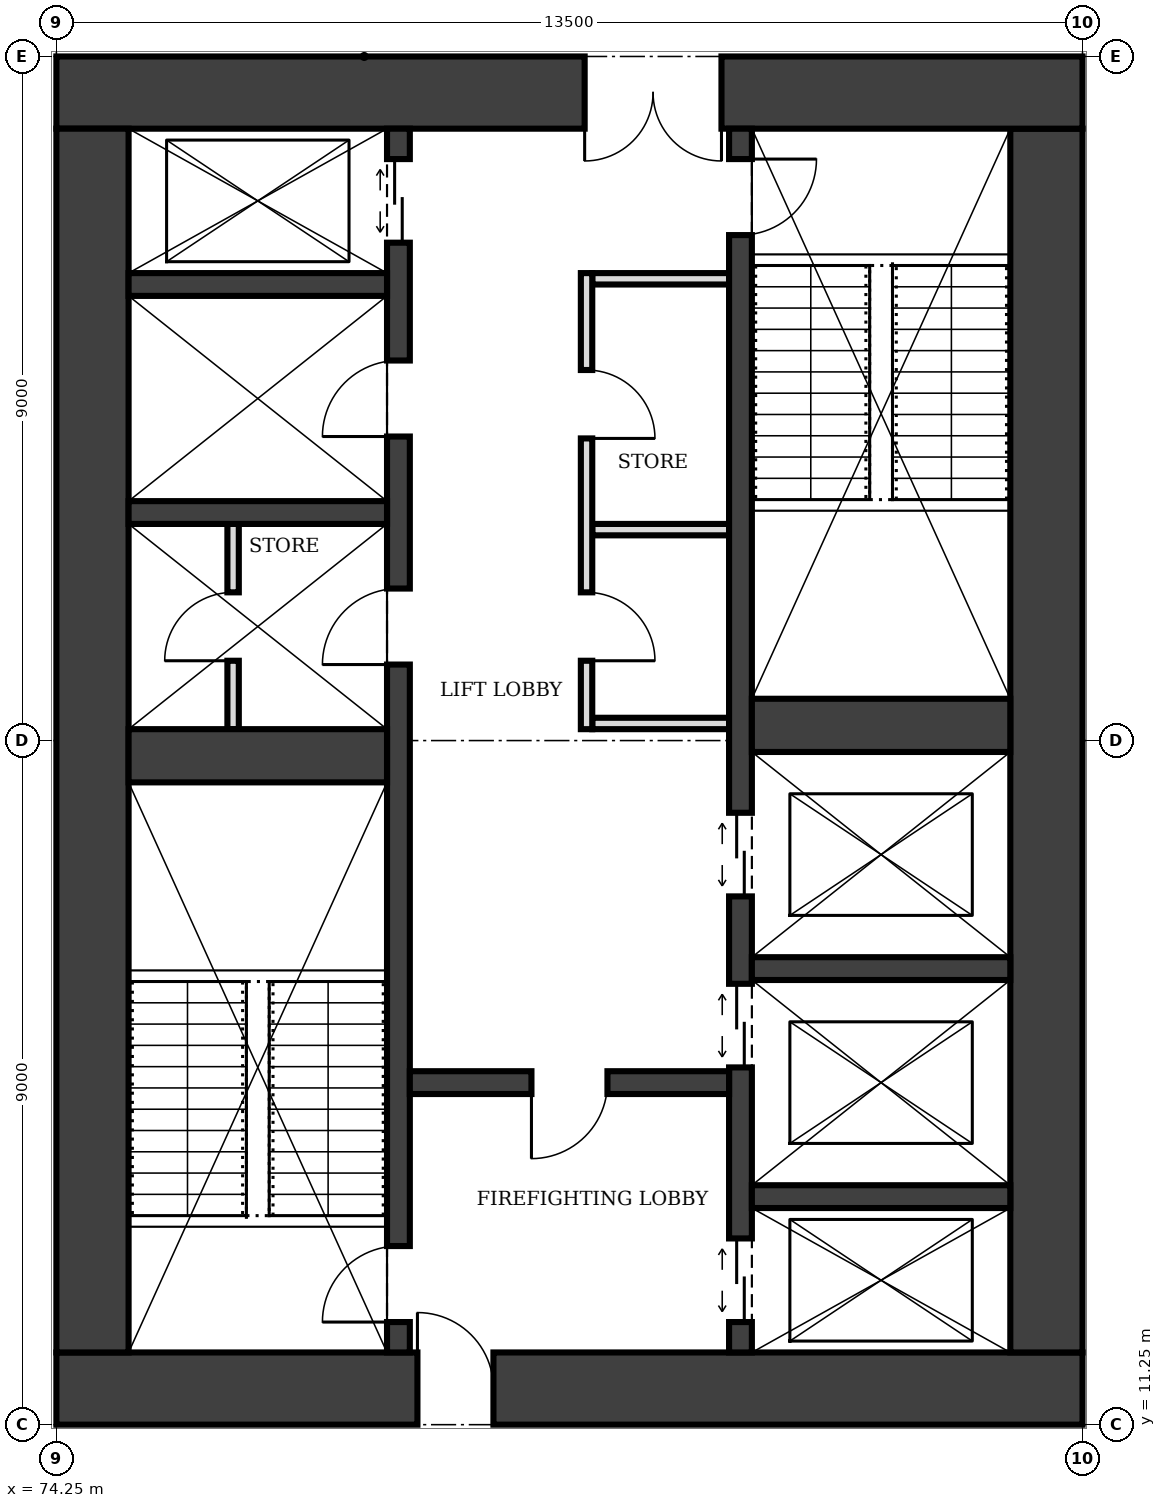
"""IFC4 building model, lengths in metres.
Left out: names, types, materials, properties, quantities, classifications, styles, units other than length and angle.
Written with IfcOpenShell. Run it as: python <this file> out.ifc"""

import sys

from ifc_helpers import new_model, si_unit, direction, frame, frame_2d, origin, place, context, subcontext, project, spatial, rectangle, extrude, element, fill, save


model = new_model("IFC4")
c1 = context("Model", 3, precision=1e-05, world=origin(), true_north=direction((0.0, 1.0)))
c2 = subcontext(c1, "Body", "Model", "MODEL_VIEW")
j1 = project(units=[si_unit("LENGTHUNIT", "METRE"), si_unit("PLANEANGLEUNIT", "RADIAN")], contexts=[c1])
p1 = place(None, origin())
s1 = spatial("IfcSite", under=j1, at=p1, CompositionType="ELEMENT")
p2 = place(p1, origin())
s2 = spatial("IfcBuilding", under=s1, at=p2, CompositionType="ELEMENT")
p3 = place(p2, frame((0.0, 0.0, 177.0)))
s3 = spatial("IfcBuildingStorey", under=s2, at=p3, CompositionType="ELEMENT", Elevation=177.0)
p4 = place(p3, frame((74.25, 11.725, 0.0), z_axis=(0.0, 0.0, 1.0), x_axis=(1.0, 0.0, 0.0)))
e1 = element("IfcWall", 1, at=p4, inside=s3, PredefinedType="SHEAR", context=c2, shape_type="SweptSolid", body=[
    extrude(rectangle(XDim=13.5, YDim=0.95, at=frame_2d((6.75, 0.0))), origin(), (0.0, 0.0, 1.0), 4.0),
])
p5 = place(p4, frame((4.75, 0.0, 0.0)))
e2 = element("IfcOpeningElement", 2, at=p5, cuts=e1, PredefinedType="OPENING", context=c2, shape_type="SweptSolid", body=[
    extrude(rectangle(XDim=1.0, YDim=2.1, at=frame_2d((0.5, 1.05))), frame((0.0, 0.485, 0.0), z_axis=(0.0, -1.0, 0.0), x_axis=(1.0, 0.0, 0.0)), (0.0, 0.0, 1.0), 0.97),
])
p6 = place(p3, frame((87.275, 12.2, 0.0), z_axis=(0.0, 0.0, 1.0), x_axis=(0.0, 1.0, 0.0)))
e3 = element("IfcWall", 3, at=p6, inside=s3, PredefinedType="SHEAR", context=c2, shape_type="SweptSolid", body=[
    extrude(rectangle(XDim=16.1, YDim=0.95, at=frame_2d((8.05, 0.0))), origin(), (0.0, 0.0, 1.0), 4.0),
])
p7 = place(p3, frame((87.75, 28.775, 0.0), z_axis=(0.0, 0.0, 1.0), x_axis=(-1.0, 0.0, 0.0)))
e4 = element("IfcWall", 4, at=p7, inside=s3, PredefinedType="SHEAR", context=c2, shape_type="SweptSolid", body=[
    extrude(rectangle(XDim=13.5, YDim=0.95, at=frame_2d((6.75, 0.0))), origin(), (0.0, 0.0, 1.0), 4.0),
])
p8 = place(p7, frame((4.75, 0.0, 0.0)))
e5 = element("IfcOpeningElement", 5, at=p8, cuts=e4, PredefinedType="OPENING", context=c2, shape_type="SweptSolid", body=[
    extrude(rectangle(XDim=1.8, YDim=2.1, at=frame_2d((0.9, 1.05))), frame((0.0, 0.485, 0.0), z_axis=(0.0, -1.0, 0.0), x_axis=(1.0, 0.0, 0.0)), (0.0, 0.0, 1.0), 0.97),
])
p9 = place(p3, frame((74.725, 28.3, 0.0), z_axis=(0.0, 0.0, 1.0), x_axis=(0.0, -1.0, 0.0)))
e6 = element("IfcWall", 6, at=p9, inside=s3, PredefinedType="SHEAR", context=c2, shape_type="SweptSolid", body=[
    extrude(rectangle(XDim=16.1, YDim=0.95, at=frame_2d((8.05, 0.0))), origin(), (0.0, 0.0, 1.0), 4.0),
])
p10 = place(p3, frame((78.75, 12.2, 0.0), z_axis=(0.0, 0.0, 1.0), x_axis=(0.0, 1.0, 0.0)))
e7 = element("IfcWall", 7, at=p10, inside=s3, PredefinedType="SHEAR", context=c2, shape_type="SweptSolid", body=[
    extrude(rectangle(XDim=16.1, YDim=0.3, at=frame_2d((8.05, 0.0))), origin(), (0.0, 0.0, 1.0), 4.0),
])
p11 = place(p10, frame((0.4, 0.0, 0.0)))
e8 = element("IfcOpeningElement", 8, at=p11, cuts=e7, PredefinedType="OPENING", context=c2, shape_type="SweptSolid", body=[
    extrude(rectangle(XDim=1.0, YDim=2.1, at=frame_2d((0.5, 1.05))), frame((0.0, 0.16, 0.0), z_axis=(0.0, -1.0, 0.0), x_axis=(1.0, 0.0, 0.0)), (0.0, 0.0, 1.0), 0.32),
])
p12 = place(p10, frame((14.6, 0.0, 0.0)))
e9 = element("IfcOpeningElement", 9, at=p12, cuts=e7, PredefinedType="OPENING", context=c2, shape_type="SweptSolid", body=[
    extrude(rectangle(XDim=1.1, YDim=2.1, at=frame_2d((0.55, 1.05))), frame((0.0, 0.16, 0.0), z_axis=(0.0, -1.0, 0.0), x_axis=(1.0, 0.0, 0.0)), (0.0, 0.0, 1.0), 0.32),
])
p13 = place(p10, frame((9.05, 0.0, 0.0)))
e10 = element("IfcOpeningElement", 10, at=p13, cuts=e7, PredefinedType="OPENING", context=c2, shape_type="SweptSolid", body=[
    extrude(rectangle(XDim=1.0, YDim=2.1, at=frame_2d((0.5, 1.05))), frame((0.0, 0.16, 0.0), z_axis=(0.0, -1.0, 0.0), x_axis=(1.0, 0.0, 0.0)), (0.0, 0.0, 1.0), 0.32),
])
p14 = place(p10, frame((12.05, 0.0, 0.0)))
e11 = element("IfcOpeningElement", 11, at=p14, cuts=e7, PredefinedType="OPENING", context=c2, shape_type="SweptSolid", body=[
    extrude(rectangle(XDim=1.0, YDim=2.1, at=frame_2d((0.5, 1.05))), frame((0.0, 0.16, 0.0), z_axis=(0.0, -1.0, 0.0), x_axis=(1.0, 0.0, 0.0)), (0.0, 0.0, 1.0), 0.32),
])
p15 = place(p3, frame((83.25, 12.2, 0.0), z_axis=(0.0, 0.0, 1.0), x_axis=(0.0, 1.0, 0.0)))
e12 = element("IfcWall", 12, at=p15, inside=s3, PredefinedType="SHEAR", context=c2, shape_type="SweptSolid", body=[
    extrude(rectangle(XDim=16.1, YDim=0.3, at=frame_2d((8.05, 0.0))), origin(), (0.0, 0.0, 1.0), 4.0),
])
p16 = place(p15, frame((14.7, 0.0, 0.0)))
e13 = element("IfcOpeningElement", 13, at=p16, cuts=e12, PredefinedType="OPENING", context=c2, shape_type="SweptSolid", body=[
    extrude(rectangle(XDim=1.0, YDim=2.1, at=frame_2d((0.5, 1.05))), frame((0.0, 0.16, 0.0), z_axis=(0.0, -1.0, 0.0), x_axis=(1.0, 0.0, 0.0)), (0.0, 0.0, 1.0), 0.32),
])
p17 = place(p15, frame((0.4, 0.0, 0.0)))
e14 = element("IfcOpeningElement", 14, at=p17, cuts=e12, PredefinedType="OPENING", context=c2, shape_type="SweptSolid", body=[
    extrude(rectangle(XDim=1.1, YDim=2.1, at=frame_2d((0.55, 1.05))), frame((0.0, 0.16, 0.0), z_axis=(0.0, -1.0, 0.0), x_axis=(1.0, 0.0, 0.0)), (0.0, 0.0, 1.0), 0.32),
])
p18 = place(p15, frame((3.75, 0.0, 0.0)))
e15 = element("IfcOpeningElement", 15, at=p18, cuts=e12, PredefinedType="OPENING", context=c2, shape_type="SweptSolid", body=[
    extrude(rectangle(XDim=1.1, YDim=2.1, at=frame_2d((0.55, 1.05))), frame((0.0, 0.16, 0.0), z_axis=(0.0, -1.0, 0.0), x_axis=(1.0, 0.0, 0.0)), (0.0, 0.0, 1.0), 0.32),
])
p19 = place(p15, frame((6.0, 0.0, 0.0)))
e16 = element("IfcOpeningElement", 16, at=p19, cuts=e12, PredefinedType="OPENING", context=c2, shape_type="SweptSolid", body=[
    extrude(rectangle(XDim=1.1, YDim=2.1, at=frame_2d((0.55, 1.05))), frame((0.0, 0.16, 0.0), z_axis=(0.0, -1.0, 0.0), x_axis=(1.0, 0.0, 0.0)), (0.0, 0.0, 1.0), 0.32),
])
p20 = place(p3, frame((75.2, 20.05, 0.0), z_axis=(0.0, 0.0, 1.0), x_axis=(1.0, 0.0, 0.0)))
e17 = element("IfcWall", 17, at=p20, inside=s3, PredefinedType="SHEAR", context=c2, shape_type="SweptSolid", body=[
    extrude(rectangle(XDim=3.4, YDim=0.7, at=frame_2d((1.7, 0.0))), origin(), (0.0, 0.0, 1.0), 4.0),
])
p21 = place(p3, frame((78.9, 15.75, 0.0), z_axis=(0.0, 0.0, 1.0), x_axis=(1.0, 0.0, 0.0)))
e18 = element("IfcWall", 18, at=p21, inside=s3, PredefinedType="SHEAR", context=c2, shape_type="SweptSolid", body=[
    extrude(rectangle(XDim=4.2, YDim=0.3, at=frame_2d((2.1, 0.0))), origin(), (0.0, 0.0, 1.0), 4.0),
])
p22 = place(p21, frame((1.6, 0.0, 0.0)))
e19 = element("IfcOpeningElement", 19, at=p22, cuts=e18, PredefinedType="OPENING", context=c2, shape_type="SweptSolid", body=[
    extrude(rectangle(XDim=1.0, YDim=2.1, at=frame_2d((0.5, 1.05))), frame((0.0, 0.16, 0.0), z_axis=(0.0, -1.0, 0.0), x_axis=(1.0, 0.0, 0.0)), (0.0, 0.0, 1.0), 0.32),
])
for number, where, z_axis, x_axis in (
    (20, (83.4, 14.25, 0.0), (0.0, 0.0, 1.0), (1.0, 0.0, 0.0)),
    (21, (83.4, 17.25, 0.0), (0.0, 0.0, 1.0), (1.0, 0.0, 0.0)),
):
    element("IfcWall", number, at=place(p3, frame(where, z_axis=z_axis, x_axis=x_axis)), inside=s3, PredefinedType="SHEAR", context=c2, shape_type="SweptSolid", body=[
        extrude(rectangle(XDim=3.4, YDim=0.3, at=frame_2d((1.7, 0.0))), origin(), (0.0, 0.0, 1.0), 4.0),
    ])
p23 = place(p3, frame((83.4, 20.45, 0.0), z_axis=(0.0, 0.0, 1.0), x_axis=(1.0, 0.0, 0.0)))
e22 = element("IfcWall", 22, at=p23, inside=s3, PredefinedType="SHEAR", context=c2, shape_type="SweptSolid", body=[
    extrude(rectangle(XDim=3.4, YDim=0.7, at=frame_2d((1.7, 0.0))), origin(), (0.0, 0.0, 1.0), 4.0),
])
for number, where, z_axis, x_axis in (
    (23, (75.2, 23.25, 0.0), (0.0, 0.0, 1.0), (1.0, 0.0, 0.0)),
    (24, (75.2, 26.25, 0.0), (0.0, 0.0, 1.0), (1.0, 0.0, 0.0)),
):
    element("IfcWall", number, at=place(p3, frame(where, z_axis=z_axis, x_axis=x_axis)), inside=s3, PredefinedType="SHEAR", context=c2, shape_type="SweptSolid", body=[
        extrude(rectangle(XDim=3.4, YDim=0.3, at=frame_2d((1.7, 0.0))), origin(), (0.0, 0.0, 1.0), 4.0),
    ])
p24 = place(p3, frame((81.225, 20.4, 0.0), z_axis=(0.0, 0.0, 1.0), x_axis=(0.0, 1.0, 0.0)))
e25 = element("IfcWall", 25, at=p24, inside=s3, PredefinedType="PARTITIONING", context=c2, shape_type="SweptSolid", body=[
    extrude(rectangle(XDim=6.0, YDim=0.15, at=frame_2d((3.0, 0.0))), origin(), (0.0, 0.0, 1.0), 3.75),
])
p25 = place(p24, frame((0.9, 0.0, 0.0)))
e26 = element("IfcOpeningElement", 26, at=p25, cuts=e25, PredefinedType="OPENING", context=c2, shape_type="SweptSolid", body=[
    extrude(rectangle(XDim=0.9, YDim=2.1, at=frame_2d((0.45, 1.05))), frame((0.0, 0.085, 0.0), z_axis=(0.0, -1.0, 0.0), x_axis=(1.0, 0.0, 0.0)), (0.0, 0.0, 1.0), 0.17),
])
p26 = place(p24, frame((3.825, 0.0, 0.0)))
e27 = element("IfcOpeningElement", 27, at=p26, cuts=e25, PredefinedType="OPENING", context=c2, shape_type="SweptSolid", body=[
    extrude(rectangle(XDim=0.9, YDim=2.1, at=frame_2d((0.45, 1.05))), frame((0.0, 0.085, 0.0), z_axis=(0.0, -1.0, 0.0), x_axis=(1.0, 0.0, 0.0)), (0.0, 0.0, 1.0), 0.17),
])
for number, where, z_axis, x_axis in (
    (28, (81.3, 20.475, 0.0), (0.0, 0.0, 1.0), (1.0, 0.0, 0.0)),
    (29, (81.3, 23.025, 0.0), (0.0, 0.0, 1.0), (1.0, 0.0, 0.0)),
    (30, (81.3, 26.325, 0.0), (0.0, 0.0, 1.0), (1.0, 0.0, 0.0)),
):
    element("IfcWall", number, at=place(p3, frame(where, z_axis=z_axis, x_axis=x_axis)), inside=s3, PredefinedType="PARTITIONING", context=c2, shape_type="SweptSolid", body=[
        extrude(rectangle(XDim=1.8, YDim=0.15, at=frame_2d((0.9, 0.0))), origin(), (0.0, 0.0, 1.0), 3.75),
    ])
p27 = place(p3, frame((76.575, 20.4, 0.0), z_axis=(0.0, 0.0, 1.0), x_axis=(0.0, 1.0, 0.0)))
e31 = element("IfcWall", 31, at=p27, inside=s3, PredefinedType="PARTITIONING", context=c2, shape_type="SweptSolid", body=[
    extrude(rectangle(XDim=2.7, YDim=0.15, at=frame_2d((1.35, 0.0))), origin(), (0.0, 0.0, 1.0), 3.75),
])
p28 = place(p27, frame((0.9, 0.0, 0.0)))
e32 = element("IfcOpeningElement", 32, at=p28, cuts=e31, PredefinedType="OPENING", context=c2, shape_type="SweptSolid", body=[
    extrude(rectangle(XDim=0.9, YDim=2.1, at=frame_2d((0.45, 1.05))), frame((0.0, 0.085, 0.0), z_axis=(0.0, -1.0, 0.0), x_axis=(1.0, 0.0, 0.0)), (0.0, 0.0, 1.0), 0.17),
])
p29 = place(p5, origin())
e33 = element("IfcDoor", 33, at=p29, inside=s3, OperationType="SINGLE_SWING_LEFT", PredefinedType="DOOR", context=c2, shape_type="SweptSolid", body=[
    extrude(rectangle(XDim=1.0, YDim=2.1, at=frame_2d((0.5, 1.05))), frame((0.0, 0.025, 0.0), z_axis=(0.0, -1.0, 0.0), x_axis=(1.0, 0.0, 0.0)), (0.0, 0.0, 1.0), 0.05),
])
fill(e2, e33)
p30 = place(p8, origin())
e34 = element("IfcDoor", 34, at=p30, inside=s3, OperationType="DOUBLE_DOOR_SINGLE_SWING", PredefinedType="DOOR", context=c2, shape_type="SweptSolid", body=[
    extrude(rectangle(XDim=1.8, YDim=2.1, at=frame_2d((0.9, 1.05))), frame((0.0, 0.025, 0.0), z_axis=(0.0, -1.0, 0.0), x_axis=(1.0, 0.0, 0.0)), (0.0, 0.0, 1.0), 0.05),
])
fill(e5, e34)
p31 = place(p22, frame((1.0, 0.0, 0.0), z_axis=(0.0, 0.0, 1.0), x_axis=(-1.0, 0.0, 0.0)))
e35 = element("IfcDoor", 35, at=p31, inside=s3, OperationType="SINGLE_SWING_RIGHT", PredefinedType="DOOR", context=c2, shape_type="SweptSolid", body=[
    extrude(rectangle(XDim=1.0, YDim=2.1, at=frame_2d((0.5, 1.05))), frame((0.0, 0.025, 0.0), z_axis=(0.0, -1.0, 0.0), x_axis=(1.0, 0.0, 0.0)), (0.0, 0.0, 1.0), 0.05),
])
fill(e19, e35)
p32 = place(p11, origin())
e36 = element("IfcDoor", 36, at=p32, inside=s3, OperationType="SINGLE_SWING_LEFT", PredefinedType="DOOR", context=c2, shape_type="SweptSolid", body=[
    extrude(rectangle(XDim=1.0, YDim=2.1, at=frame_2d((0.5, 1.05))), frame((0.0, 0.025, 0.0), z_axis=(0.0, -1.0, 0.0), x_axis=(1.0, 0.0, 0.0)), (0.0, 0.0, 1.0), 0.05),
])
fill(e8, e36)
p33 = place(p16, frame((1.0, 0.0, 0.0), z_axis=(0.0, 0.0, 1.0), x_axis=(-1.0, 0.0, 0.0)))
e37 = element("IfcDoor", 37, at=p33, inside=s3, OperationType="SINGLE_SWING_LEFT", PredefinedType="DOOR", context=c2, shape_type="SweptSolid", body=[
    extrude(rectangle(XDim=1.0, YDim=2.1, at=frame_2d((0.5, 1.05))), frame((0.0, 0.025, 0.0), z_axis=(0.0, -1.0, 0.0), x_axis=(1.0, 0.0, 0.0)), (0.0, 0.0, 1.0), 0.05),
])
fill(e13, e37)
p34 = place(p17, origin())
e38 = element("IfcDoor", 38, at=p34, inside=s3, OperationType="DOUBLE_DOOR_SLIDING", PredefinedType="DOOR", context=c2, shape_type="SweptSolid", body=[
    extrude(rectangle(XDim=1.1, YDim=2.1, at=frame_2d((0.55, 1.05))), frame((0.0, 0.025, 0.0), z_axis=(0.0, -1.0, 0.0), x_axis=(1.0, 0.0, 0.0)), (0.0, 0.0, 1.0), 0.05),
])
fill(e14, e38)
p35 = place(p12, origin())
e39 = element("IfcDoor", 39, at=p35, inside=s3, OperationType="DOUBLE_DOOR_SLIDING", PredefinedType="DOOR", context=c2, shape_type="SweptSolid", body=[
    extrude(rectangle(XDim=1.1, YDim=2.1, at=frame_2d((0.55, 1.05))), frame((0.0, 0.025, 0.0), z_axis=(0.0, -1.0, 0.0), x_axis=(1.0, 0.0, 0.0)), (0.0, 0.0, 1.0), 0.05),
])
fill(e9, e39)
p36 = place(p18, origin())
e40 = element("IfcDoor", 40, at=p36, inside=s3, OperationType="DOUBLE_DOOR_SLIDING", PredefinedType="DOOR", context=c2, shape_type="SweptSolid", body=[
    extrude(rectangle(XDim=1.1, YDim=2.1, at=frame_2d((0.55, 1.05))), frame((0.0, 0.025, 0.0), z_axis=(0.0, -1.0, 0.0), x_axis=(1.0, 0.0, 0.0)), (0.0, 0.0, 1.0), 0.05),
])
fill(e15, e40)
p37 = place(p19, origin())
e41 = element("IfcDoor", 41, at=p37, inside=s3, OperationType="DOUBLE_DOOR_SLIDING", PredefinedType="DOOR", context=c2, shape_type="SweptSolid", body=[
    extrude(rectangle(XDim=1.1, YDim=2.1, at=frame_2d((0.55, 1.05))), frame((0.0, 0.025, 0.0), z_axis=(0.0, -1.0, 0.0), x_axis=(1.0, 0.0, 0.0)), (0.0, 0.0, 1.0), 0.05),
])
fill(e16, e41)
p38 = place(p25, frame((0.9, 0.0, 0.0), z_axis=(0.0, 0.0, 1.0), x_axis=(-1.0, 0.0, 0.0)))
e42 = element("IfcDoor", 42, at=p38, inside=s3, OperationType="SINGLE_SWING_RIGHT", PredefinedType="DOOR", context=c2, shape_type="SweptSolid", body=[
    extrude(rectangle(XDim=0.9, YDim=2.1, at=frame_2d((0.45, 1.05))), frame((0.0, 0.025, 0.0), z_axis=(0.0, -1.0, 0.0), x_axis=(1.0, 0.0, 0.0)), (0.0, 0.0, 1.0), 0.05),
])
fill(e26, e42)
p39 = place(p26, frame((0.9, 0.0, 0.0), z_axis=(0.0, 0.0, 1.0), x_axis=(-1.0, 0.0, 0.0)))
e43 = element("IfcDoor", 43, at=p39, inside=s3, OperationType="SINGLE_SWING_RIGHT", PredefinedType="DOOR", context=c2, shape_type="SweptSolid", body=[
    extrude(rectangle(XDim=0.9, YDim=2.1, at=frame_2d((0.45, 1.05))), frame((0.0, 0.025, 0.0), z_axis=(0.0, -1.0, 0.0), x_axis=(1.0, 0.0, 0.0)), (0.0, 0.0, 1.0), 0.05),
])
fill(e27, e43)
p40 = place(p13, origin())
e44 = element("IfcDoor", 44, at=p40, inside=s3, OperationType="SINGLE_SWING_LEFT", PredefinedType="DOOR", context=c2, shape_type="SweptSolid", body=[
    extrude(rectangle(XDim=1.0, YDim=2.1, at=frame_2d((0.5, 1.05))), frame((0.0, 0.025, 0.0), z_axis=(0.0, -1.0, 0.0), x_axis=(1.0, 0.0, 0.0)), (0.0, 0.0, 1.0), 0.05),
])
fill(e10, e44)
p41 = place(p28, origin())
e45 = element("IfcDoor", 45, at=p41, inside=s3, OperationType="SINGLE_SWING_LEFT", PredefinedType="DOOR", context=c2, shape_type="SweptSolid", body=[
    extrude(rectangle(XDim=0.9, YDim=2.1, at=frame_2d((0.45, 1.05))), frame((0.0, 0.025, 0.0), z_axis=(0.0, -1.0, 0.0), x_axis=(1.0, 0.0, 0.0)), (0.0, 0.0, 1.0), 0.05),
])
fill(e32, e45)
p42 = place(p14, origin())
e46 = element("IfcDoor", 46, at=p42, inside=s3, OperationType="SINGLE_SWING_LEFT", PredefinedType="DOOR", context=c2, shape_type="SweptSolid", body=[
    extrude(rectangle(XDim=1.0, YDim=2.1, at=frame_2d((0.5, 1.05))), frame((0.0, 0.025, 0.0), z_axis=(0.0, -1.0, 0.0), x_axis=(1.0, 0.0, 0.0)), (0.0, 0.0, 1.0), 0.05),
])
fill(e11, e46)
save(model, sys.argv[1])
